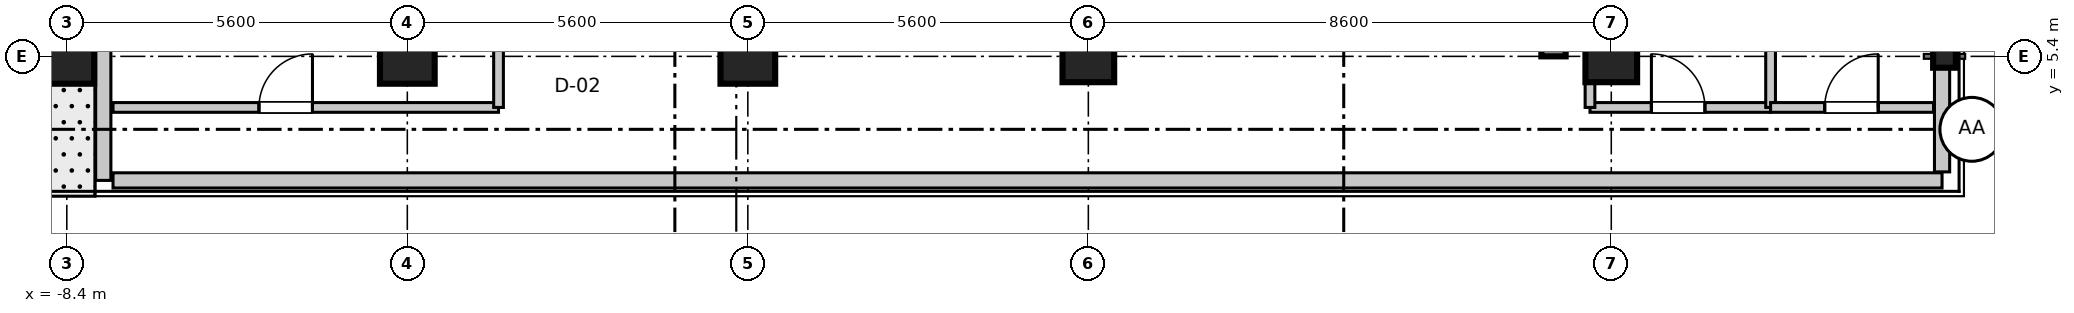
"""IFC4 building model, lengths in metres.
Left out: names, types, materials, properties, quantities, classifications, styles, units other than length and angle.
Written with IfcOpenShell. Run it as: python <this file> out.ifc"""

import sys

from ifc_helpers import new_model, si_unit, direction, frame, frame_2d, origin, origin_2d, place, context, subcontext, project, spatial, rectangle, i_section, extrude, source, transform, mapped, element, fill, save


model = new_model("IFC4")
c1 = context("Model", 3, precision=1e-05, world=origin(), true_north=direction((0.0, 1.0)))
c2 = subcontext(c1, "Body", "Model", "MODEL_VIEW")
j1 = project(units=[si_unit("LENGTHUNIT", "METRE"), si_unit("PLANEANGLEUNIT", "RADIAN")], contexts=[c1])
p1 = place(None, origin())
s1 = spatial("IfcSite", under=j1, at=p1, CompositionType="ELEMENT")
p2 = place(p1, origin())
s2 = spatial("IfcBuilding", under=s1, at=p2, CompositionType="ELEMENT")
p3 = place(p2, frame((0.0, 0.0, 296.5)))
s3 = spatial("IfcBuildingStorey", under=s2, at=p3, CompositionType="ELEMENT", Elevation=296.5)
m1 = source(origin(), c2, "Body", "SweptSolid", [
    extrude(rectangle(XDim=0.9, YDim=0.9, at=origin_2d()), origin(), (0.0, 0.0, 1.0), 3.805),
])
for number, where, z_axis, x_axis in (
    (1, (-8.4, 5.4, 0.0), (0.0, 0.0, 1.0), (1.0, 0.0, 0.0)),
    (2, (-2.8, 5.4, 0.0), (0.0, 0.0, 1.0), (1.0, 0.0, 0.0)),
    (3, (2.8, 5.4, 0.0), (0.0, 0.0, 1.0), (1.0, 0.0, 0.0)),
):
    element("IfcColumn", number, at=place(p3, frame(where, z_axis=z_axis, x_axis=x_axis)), inside=s3, PredefinedType="COLUMN", context=c2, shape_type="MappedRepresentation", body=[
        mapped(m1, transform((0.0, 0.0, 0.0), scale=1.0)),
    ])
m2 = source(origin(), c2, "Body", "SweptSolid", [
    extrude(rectangle(XDim=0.85, YDim=0.85, at=origin_2d()), origin(), (0.0, 0.0, 1.0), 3.805),
])
for number, where, z_axis, x_axis in (
    (4, (8.4, 5.4, 0.0), (0.0, 0.0, 1.0), (1.0, 0.0, 0.0)),
    (5, (17.0, 5.4, 0.0), (0.0, 0.0, 1.0), (1.0, 0.0, 0.0)),
):
    element("IfcColumn", number, at=place(p3, frame(where, z_axis=z_axis, x_axis=x_axis)), inside=s3, PredefinedType="PILASTER", context=c2, shape_type="MappedRepresentation", body=[
        mapped(m2, transform((0.0, 0.0, 0.0), scale=1.0)),
    ])
m3 = source(origin(), c2, "Body", "SweptSolid", [
    extrude(i_section(OverallWidth=0.374, OverallDepth=0.374, WebThickness=0.014, FlangeThickness=0.023, at=origin_2d()), origin(), (0.0, 0.0, 1.0), 3.805),
])
p4 = place(p3, frame((22.48, 5.4, 0.0), z_axis=(0.0, 0.0, 1.0), x_axis=(1.0, 0.0, 0.0)))
e6 = element("IfcColumn", 6, at=p4, inside=s3, PredefinedType="COLUMN", context=c2, shape_type="MappedRepresentation", body=[
    mapped(m3, transform((0.0, 0.0, 0.0), scale=1.0)),
])
m4 = source(origin(), c2, "Body", "SweptSolid", [
    extrude(rectangle(XDim=11.6, YDim=0.4, at=frame_2d((5.8, 0.0))), origin(), (0.0, 0.0, 1.0), 3.55),
])
p5 = place(p3, frame((16.05, 5.4, 0.0), z_axis=(0.0, 0.0, 1.0), x_axis=(0.0, 1.0, 0.0)))
e7 = element("IfcWall", 7, at=p5, inside=s3, PredefinedType="SHEAR", context=c2, shape_type="MappedRepresentation", body=[
    mapped(m4, transform((0.0, 0.0, 0.0), scale=1.0)),
])
m5 = source(origin(), c2, "Body", "SweptSolid", [
    extrude(rectangle(XDim=30.08, YDim=0.25, at=frame_2d((15.04, 0.0))), origin(), (0.0, 0.0, 1.0), 2.89),
])
p6 = place(p3, frame((-7.64, 3.36, 0.0), z_axis=(0.0, 0.0, 1.0), x_axis=(1.0, 0.0, 0.0)))
e8 = element("IfcWall", 8, at=p6, inside=s3, PredefinedType="STANDARD", context=c2, shape_type="MappedRepresentation", body=[
    mapped(m5, transform((0.0, 0.0, 0.0), scale=1.0)),
])
m6 = source(origin(), c2, "Body", "SweptSolid", [
    extrude(rectangle(XDim=2.72, YDim=0.25, at=frame_2d((1.36, 0.0))), origin(), (0.0, 0.0, 1.0), 2.89),
])
p7 = place(p3, frame((-7.8, 3.36, 0.0), z_axis=(0.0, 0.0, 1.0), x_axis=(0.0, 1.0, 0.0)))
e9 = element("IfcWall", 9, at=p7, inside=s3, PredefinedType="STANDARD", context=c2, shape_type="MappedRepresentation", body=[
    mapped(m6, transform((0.0, 0.0, 0.0), scale=1.0)),
])
m7 = source(origin(), c2, "Body", "SweptSolid", [
    extrude(rectangle(XDim=16.12, YDim=0.25, at=frame_2d((8.06, 0.0))), origin(), (0.0, 0.0, 1.0), 2.89),
])
p8 = place(p3, frame((22.44, 3.5, 0.0), z_axis=(0.0, 0.0, 1.0), x_axis=(0.0, 1.0, 0.0)))
e10 = element("IfcWall", 10, at=p8, inside=s3, PredefinedType="STANDARD", context=c2, shape_type="MappedRepresentation", body=[
    mapped(m7, transform((0.0, 0.0, 0.0), scale=1.0)),
])
m8 = source(origin(), c2, "Body", "SweptSolid", [
    extrude(rectangle(XDim=6.34, YDim=0.16, at=frame_2d((3.17, 0.0))), origin(), (0.0, 0.0, 1.0), 2.89),
])
p9 = place(p3, frame((-7.64, 4.56, 0.0), z_axis=(0.0, 0.0, 1.0), x_axis=(1.0, 0.0, 0.0)))
e11 = element("IfcWall", 11, at=p9, inside=s3, PredefinedType="PARTITIONING", context=c2, shape_type="MappedRepresentation", body=[
    mapped(m8, transform((0.0, 0.0, 0.0), scale=1.0)),
])
p10 = place(p9, frame((2.4, 0.0, 0.0)))
e12 = element("IfcOpeningElement", 12, at=p10, cuts=e11, PredefinedType="OPENING", context=c2, shape_type="SweptSolid", body=[
    extrude(rectangle(XDim=0.88, YDim=2.1, at=frame_2d((0.44, 1.05))), frame((0.0, 0.09, 0.0), z_axis=(0.0, -1.0, 0.0), x_axis=(1.0, 0.0, 0.0)), (0.0, 0.0, 1.0), 0.18),
])
m9 = source(origin(), c2, "Body", "SweptSolid", [
    extrude(rectangle(XDim=1.56, YDim=0.16, at=frame_2d((0.78, 0.0))), origin(), (0.0, 0.0, 1.0), 2.89),
])
p11 = place(p3, frame((-1.3, 4.56, 0.0), z_axis=(0.0, 0.0, 1.0), x_axis=(0.0, 1.0, 0.0)))
e13 = element("IfcWall", 13, at=p11, inside=s3, PredefinedType="PARTITIONING", context=c2, shape_type="MappedRepresentation", body=[
    mapped(m9, transform((0.0, 0.0, 0.0), scale=1.0)),
])
m10 = source(origin(), c2, "Body", "SweptSolid", [
    extrude(rectangle(XDim=2.97, YDim=0.16, at=frame_2d((1.485, 0.0))), origin(), (0.0, 0.0, 1.0), 2.89),
])
p12 = place(p3, frame((16.65, 4.56, 0.0), z_axis=(0.0, 0.0, 1.0), x_axis=(1.0, 0.0, 0.0)))
e14 = element("IfcWall", 14, at=p12, inside=s3, PredefinedType="PARTITIONING", context=c2, shape_type="MappedRepresentation", body=[
    mapped(m10, transform((0.0, 0.0, 0.0), scale=1.0)),
])
p13 = place(p12, frame((1.01, 0.0, 0.0)))
e15 = element("IfcOpeningElement", 15, at=p13, cuts=e14, PredefinedType="OPENING", context=c2, shape_type="SweptSolid", body=[
    extrude(rectangle(XDim=0.88, YDim=2.1, at=frame_2d((0.44, 1.05))), frame((0.0, 0.09, 0.0), z_axis=(0.0, -1.0, 0.0), x_axis=(1.0, 0.0, 0.0)), (0.0, 0.0, 1.0), 0.18),
])
m11 = source(origin(), c2, "Body", "SweptSolid", [
    extrude(rectangle(XDim=17.74, YDim=0.16, at=frame_2d((8.87, 0.0))), origin(), (0.0, 0.0, 1.0), 2.89),
])
for number, where, z_axis, x_axis in (
    (16, (16.65, 4.56, 0.0), (0.0, 0.0, 1.0), (0.0, 1.0, 0.0)),
    (17, (19.62, 4.56, 0.0), (0.0, 0.0, 1.0), (0.0, 1.0, 0.0)),
):
    element("IfcWall", number, at=place(p3, frame(where, z_axis=z_axis, x_axis=x_axis)), inside=s3, PredefinedType="PARTITIONING", context=c2, shape_type="MappedRepresentation", body=[
        mapped(m11, transform((0.0, 0.0, 0.0), scale=1.0)),
    ])
m12 = source(origin(), c2, "Body", "SweptSolid", [
    extrude(rectangle(XDim=2.68, YDim=0.16, at=frame_2d((1.34, 0.0))), origin(), (0.0, 0.0, 1.0), 2.89),
])
p14 = place(p3, frame((19.62, 4.56, 0.0), z_axis=(0.0, 0.0, 1.0), x_axis=(1.0, 0.0, 0.0)))
e18 = element("IfcWall", 18, at=p14, inside=s3, PredefinedType="PARTITIONING", context=c2, shape_type="MappedRepresentation", body=[
    mapped(m12, transform((0.0, 0.0, 0.0), scale=1.0)),
])
p15 = place(p14, frame((0.89, 0.0, 0.0)))
e19 = element("IfcOpeningElement", 19, at=p15, cuts=e18, PredefinedType="OPENING", context=c2, shape_type="SweptSolid", body=[
    extrude(rectangle(XDim=0.88, YDim=2.1, at=frame_2d((0.44, 1.05))), frame((0.0, 0.09, 0.0), z_axis=(0.0, -1.0, 0.0), x_axis=(1.0, 0.0, 0.0)), (0.0, 0.0, 1.0), 0.18),
])
m13 = source(origin(), c2, "Body", "SweptSolid", [
    extrude(rectangle(XDim=0.88, YDim=2.1, at=frame_2d((0.44, 1.05))), frame((0.0, 0.025, 0.0), z_axis=(0.0, -1.0, 0.0), x_axis=(1.0, 0.0, 0.0)), (0.0, 0.0, 1.0), 0.05),
])
p16 = place(p10, origin())
e20 = element("IfcDoor", 20, at=p16, inside=s3, OperationType="SINGLE_SWING_RIGHT", PredefinedType="DOOR", context=c2, shape_type="MappedRepresentation", body=[
    mapped(m13, transform((0.0, 0.0, 0.0), scale=1.0)),
])
fill(e12, e20)
p17 = place(p13, origin())
e21 = element("IfcDoor", 21, at=p17, inside=s3, OperationType="SINGLE_SWING_LEFT", PredefinedType="DOOR", context=c2, shape_type="MappedRepresentation", body=[
    mapped(m13, transform((0.0, 0.0, 0.0), scale=1.0)),
])
fill(e15, e21)
p18 = place(p15, origin())
e22 = element("IfcDoor", 22, at=p18, inside=s3, OperationType="SINGLE_SWING_RIGHT", PredefinedType="DOOR", context=c2, shape_type="MappedRepresentation", body=[
    mapped(m13, transform((0.0, 0.0, 0.0), scale=1.0)),
])
fill(e19, e22)
save(model, sys.argv[1])
